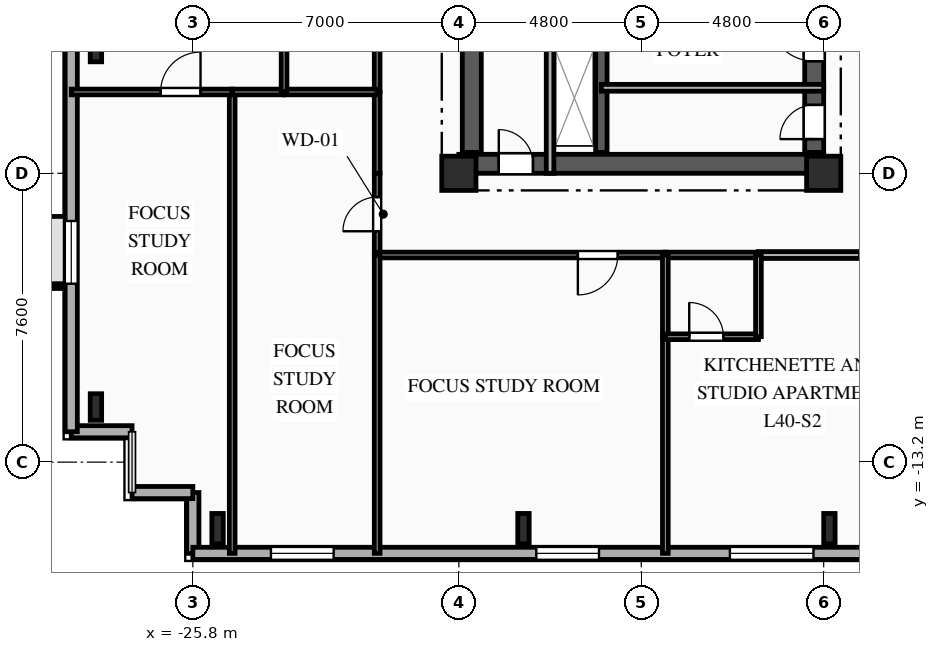
"""IFC4 building model, lengths in metres.
Left out: names, types, materials, properties, quantities, classifications, styles, units other than length and angle.
Written with IfcOpenShell. Run it as: python <this file> out.ifc"""

import sys

from ifc_helpers import new_model, si_unit, direction, frame, frame_2d, origin, origin_2d, place, context, subcontext, project, spatial, rectangle, i_section, extrude, element, fill, save


model = new_model("IFC4")
c1 = context("Model", 3, precision=1e-05, world=origin(), true_north=direction((0.0, 1.0)))
c2 = subcontext(c1, "Body", "Model", "MODEL_VIEW")
j1 = project(units=[si_unit("LENGTHUNIT", "METRE"), si_unit("PLANEANGLEUNIT", "RADIAN")], contexts=[c1])
p1 = place(None, origin())
s1 = spatial("IfcSite", under=j1, at=p1, CompositionType="ELEMENT")
p2 = place(p1, origin())
s2 = spatial("IfcBuilding", under=s1, at=p2, CompositionType="ELEMENT")
p3 = place(p2, frame((0.0, 0.0, 144.4)))
s3 = spatial("IfcBuildingStorey", under=s2, at=p3, CompositionType="ELEMENT", Elevation=144.4)
for number, where, z_axis, x_axis in (
    (1, (-18.8, -5.6, 0.0), (0.0, 0.0, 1.0), (1.0, 0.0, 0.0)),
    (2, (-9.2, -5.6, 0.0), (0.0, 0.0, 1.0), (1.0, 0.0, 0.0)),
):
    element("IfcColumn", number, at=place(p3, frame(where, z_axis=z_axis, x_axis=x_axis)), inside=s3, PredefinedType="COLUMN", context=c2, shape_type="SweptSolid", body=[
        extrude(rectangle(XDim=0.9, YDim=0.9, at=origin_2d()), origin(), (0.0, 0.0, 1.0), 3.35),
    ])
for number, where, z_axis, x_axis in (
    (3, (-25.15, -14.95, 0.0), (0.0, 0.0, 1.0), (1.0, 0.0, 0.0)),
    (4, (-17.1, -14.95, 0.0), (0.0, 0.0, 1.0), (1.0, 0.0, 0.0)),
    (5, (-9.05, -14.95, 0.0), (0.0, 0.0, 1.0), (1.0, 0.0, 0.0)),
):
    element("IfcColumn", number, at=place(p3, frame(where, z_axis=z_axis, x_axis=x_axis)), inside=s3, PredefinedType="COLUMN", context=c2, shape_type="SweptSolid", body=[
        extrude(i_section(OverallWidth=0.3, OverallDepth=0.8, WebThickness=0.018, FlangeThickness=0.033, FilletRadius=0.03, at=origin_2d()), origin(), (0.0, 0.0, 1.0), 3.35),
    ])
for number, where, z_axis, x_axis in (
    (6, (-28.35, -2.317, 0.0), (0.0, 0.0, 1.0), (1.0, 0.0, 0.0)),
    (7, (-28.35, -11.75, 0.0), (0.0, 0.0, 1.0), (1.0, 0.0, 0.0)),
):
    element("IfcColumn", number, at=place(p3, frame(where, z_axis=z_axis, x_axis=x_axis)), inside=s3, PredefinedType="COLUMN", context=c2, shape_type="SweptSolid", body=[
        extrude(i_section(OverallWidth=0.3, OverallDepth=0.7, WebThickness=0.017, FlangeThickness=0.032, FilletRadius=0.027, at=origin_2d()), origin(), (0.0, 0.0, 1.0), 3.35),
    ])
p4 = place(p3, frame((-25.8, -15.6, 0.0), z_axis=(0.0, 0.0, 1.0), x_axis=(0.0, 1.0, 0.0)))
e8 = element("IfcWall", 8, at=p4, inside=s3, PredefinedType="SOLIDWALL", context=c2, shape_type="SweptSolid", body=[
    extrude(rectangle(XDim=1.6, YDim=0.32, at=frame_2d((0.8, 0.0))), origin(), (0.0, 0.0, 1.0), 3.04),
])
p5 = place(p3, frame((-25.8, -14.0, 0.0), z_axis=(0.0, 0.0, 1.0), x_axis=(-1.0, 0.0, 0.0)))
e9 = element("IfcWall", 9, at=p5, inside=s3, PredefinedType="SOLIDWALL", context=c2, shape_type="SweptSolid", body=[
    extrude(rectangle(XDim=1.6, YDim=0.32, at=frame_2d((0.8, 0.0))), origin(), (0.0, 0.0, 1.0), 3.04),
])
p6 = place(p3, frame((-27.4, -12.4, 0.0), z_axis=(0.0, 0.0, 1.0), x_axis=(-1.0, 0.0, 0.0)))
e10 = element("IfcWall", 10, at=p6, inside=s3, PredefinedType="SOLIDWALL", context=c2, shape_type="SweptSolid", body=[
    extrude(rectangle(XDim=1.6, YDim=0.32, at=frame_2d((0.8, 0.0))), origin(), (0.0, 0.0, 1.0), 3.04),
])
p7 = place(p3, frame((-29.0, -12.4, 0.0), z_axis=(0.0, 0.0, 1.0), x_axis=(0.0, 1.0, 0.0)))
e11 = element("IfcWall", 11, at=p7, inside=s3, PredefinedType="SOLIDWALL", context=c2, shape_type="SweptSolid", body=[
    extrude(rectangle(XDim=29.6, YDim=0.32, at=frame_2d((14.8, 0.0))), origin(), (0.0, 0.0, 1.0), 3.04),
])
p8 = place(p7, frame((3.895, 0.0, 0.85)))
e12 = element("IfcOpeningElement", 12, at=p8, cuts=e11, PredefinedType="OPENING", context=c2, shape_type="SweptSolid", body=[
    extrude(rectangle(XDim=1.65, YDim=1.85, at=frame_2d((0.825, 0.925))), frame((0.0, 0.17, 0.0), z_axis=(0.0, -1.0, 0.0), x_axis=(1.0, 0.0, 0.0)), (0.0, 0.0, 1.0), 0.34),
])
p9 = place(p7, frame((13.74, 0.0, 0.85)))
e13 = element("IfcOpeningElement", 13, at=p9, cuts=e11, PredefinedType="OPENING", context=c2, shape_type="SweptSolid", body=[
    extrude(rectangle(XDim=2.2, YDim=1.85, at=frame_2d((1.1, 0.925))), frame((0.0, 0.17, 0.0), z_axis=(0.0, -1.0, 0.0), x_axis=(1.0, 0.0, 0.0)), (0.0, 0.0, 1.0), 0.34),
])
p10 = place(p7, frame((24.135, 0.0, 0.85)))
e14 = element("IfcOpeningElement", 14, at=p10, cuts=e11, PredefinedType="OPENING", context=c2, shape_type="SweptSolid", body=[
    extrude(rectangle(XDim=1.65, YDim=1.85, at=frame_2d((0.825, 0.925))), frame((0.0, 0.17, 0.0), z_axis=(0.0, -1.0, 0.0), x_axis=(1.0, 0.0, 0.0)), (0.0, 0.0, 1.0), 0.34),
])
p11 = place(p3, frame((23.8, -15.6, 0.0), z_axis=(0.0, 0.0, 1.0), x_axis=(-1.0, 0.0, 0.0)))
e15 = element("IfcWall", 15, at=p11, inside=s3, PredefinedType="SOLIDWALL", context=c2, shape_type="SweptSolid", body=[
    extrude(rectangle(XDim=49.6, YDim=0.32, at=frame_2d((24.8, 0.0))), origin(), (0.0, 0.0, 1.0), 3.04),
])
p12 = place(p11, frame((1.13, 0.0, 0.85)))
e16 = element("IfcOpeningElement", 16, at=p12, cuts=e15, PredefinedType="OPENING", context=c2, shape_type="SweptSolid", body=[
    extrude(rectangle(XDim=1.1, YDim=1.85, at=frame_2d((0.55, 0.925))), frame((0.0, 0.17, 0.0), z_axis=(0.0, -1.0, 0.0), x_axis=(1.0, 0.0, 0.0)), (0.0, 0.0, 1.0), 0.34),
])
p13 = place(p11, frame((5.255, 0.0, 0.85)))
e17 = element("IfcOpeningElement", 17, at=p13, cuts=e15, PredefinedType="OPENING", context=c2, shape_type="SweptSolid", body=[
    extrude(rectangle(XDim=1.65, YDim=1.85, at=frame_2d((0.825, 0.925))), frame((0.0, 0.17, 0.0), z_axis=(0.0, -1.0, 0.0), x_axis=(1.0, 0.0, 0.0)), (0.0, 0.0, 1.0), 0.34),
])
p14 = place(p11, frame((11.66, 0.0, 0.85)))
e18 = element("IfcOpeningElement", 18, at=p14, cuts=e15, PredefinedType="OPENING", context=c2, shape_type="SweptSolid", body=[
    extrude(rectangle(XDim=2.2, YDim=1.85, at=frame_2d((1.1, 0.925))), frame((0.0, 0.17, 0.0), z_axis=(0.0, -1.0, 0.0), x_axis=(1.0, 0.0, 0.0)), (0.0, 0.0, 1.0), 0.34),
])
p15 = place(p11, frame((18.66, 0.0, 0.85)))
e19 = element("IfcOpeningElement", 19, at=p15, cuts=e15, PredefinedType="OPENING", context=c2, shape_type="SweptSolid", body=[
    extrude(rectangle(XDim=2.2, YDim=1.85, at=frame_2d((1.1, 0.925))), frame((0.0, 0.17, 0.0), z_axis=(0.0, -1.0, 0.0), x_axis=(1.0, 0.0, 0.0)), (0.0, 0.0, 1.0), 0.34),
])
p16 = place(p11, frame((25.66, 0.0, 0.85)))
e20 = element("IfcOpeningElement", 20, at=p16, cuts=e15, PredefinedType="OPENING", context=c2, shape_type="SweptSolid", body=[
    extrude(rectangle(XDim=2.2, YDim=1.85, at=frame_2d((1.1, 0.925))), frame((0.0, 0.17, 0.0), z_axis=(0.0, -1.0, 0.0), x_axis=(1.0, 0.0, 0.0)), (0.0, 0.0, 1.0), 0.34),
])
p17 = place(p11, frame((33.268, 0.0, 0.85)))
e21 = element("IfcOpeningElement", 21, at=p17, cuts=e15, PredefinedType="OPENING", context=c2, shape_type="SweptSolid", body=[
    extrude(rectangle(XDim=2.2, YDim=1.85, at=frame_2d((1.1, 0.925))), frame((0.0, 0.17, 0.0), z_axis=(0.0, -1.0, 0.0), x_axis=(1.0, 0.0, 0.0)), (0.0, 0.0, 1.0), 0.34),
])
p18 = place(p11, frame((38.913, 0.0, 0.85)))
e22 = element("IfcOpeningElement", 22, at=p18, cuts=e15, PredefinedType="OPENING", context=c2, shape_type="SweptSolid", body=[
    extrude(rectangle(XDim=1.65, YDim=1.85, at=frame_2d((0.825, 0.925))), frame((0.0, 0.17, 0.0), z_axis=(0.0, -1.0, 0.0), x_axis=(1.0, 0.0, 0.0)), (0.0, 0.0, 1.0), 0.34),
])
p19 = place(p11, frame((45.895, 0.0, 0.85)))
e23 = element("IfcOpeningElement", 23, at=p19, cuts=e15, PredefinedType="OPENING", context=c2, shape_type="SweptSolid", body=[
    extrude(rectangle(XDim=1.65, YDim=1.85, at=frame_2d((0.825, 0.925))), frame((0.0, 0.17, 0.0), z_axis=(0.0, -1.0, 0.0), x_axis=(1.0, 0.0, 0.0)), (0.0, 0.0, 1.0), 0.34),
])
p20 = place(p3, frame((-18.8, -5.35, 0.0), z_axis=(0.0, 0.0, 1.0), x_axis=(1.0, 0.0, 0.0)))
e24 = element("IfcWall", 24, at=p20, inside=s3, PredefinedType="SHEAR", context=c2, shape_type="SweptSolid", body=[
    extrude(rectangle(XDim=9.6, YDim=0.5, at=frame_2d((4.8, 0.0))), origin(), (0.0, 0.0, 1.0), 3.04),
])
p21 = place(p20, frame((1.05, 0.0, 0.0)))
e25 = element("IfcOpeningElement", 25, at=p21, cuts=e24, PredefinedType="OPENING", context=c2, shape_type="SweptSolid", body=[
    extrude(rectangle(XDim=0.9, YDim=2.1, at=frame_2d((0.45, 1.05))), frame((0.0, 0.26, 0.0), z_axis=(0.0, -1.0, 0.0), x_axis=(1.0, 0.0, 0.0)), (0.0, 0.0, 1.0), 0.52),
])
p22 = place(p3, frame((-18.46, -5.05, 0.0), z_axis=(0.0, 0.0, 1.0), x_axis=(0.0, 1.0, 0.0)))
e26 = element("IfcWall", 26, at=p22, inside=s3, PredefinedType="SHEAR", context=c2, shape_type="SweptSolid", body=[
    extrude(rectangle(XDim=10.1, YDim=0.5, at=frame_2d((5.05, 0.0))), origin(), (0.0, 0.0, 1.0), 3.04),
])
p23 = place(p3, frame((-9.45, -5.05, 0.0), z_axis=(0.0, 0.0, 1.0), x_axis=(0.0, 1.0, 0.0)))
e27 = element("IfcWall", 27, at=p23, inside=s3, PredefinedType="SHEAR", context=c2, shape_type="SweptSolid", body=[
    extrude(rectangle(XDim=10.1, YDim=0.5, at=frame_2d((5.05, 0.0))), origin(), (0.0, 0.0, 1.0), 3.04),
])
p24 = place(p23, frame((7.175, 0.0, 0.0)))
e28 = element("IfcOpeningElement", 28, at=p24, cuts=e27, PredefinedType="OPENING", context=c2, shape_type="SweptSolid", body=[
    extrude(rectangle(XDim=0.9, YDim=2.1, at=frame_2d((0.45, 1.05))), frame((0.0, 0.26, 0.0), z_axis=(0.0, -1.0, 0.0), x_axis=(1.0, 0.0, 0.0)), (0.0, 0.0, 1.0), 0.52),
])
p25 = place(p23, frame((2.4, 0.0, 0.0)))
e29 = element("IfcOpeningElement", 29, at=p25, cuts=e27, PredefinedType="OPENING", context=c2, shape_type="SweptSolid", body=[
    extrude(rectangle(XDim=1.2, YDim=2.15, at=frame_2d((0.6, 1.075))), frame((0.0, 0.26, 0.0), z_axis=(0.0, -1.0, 0.0), x_axis=(1.0, 0.0, 0.0)), (0.0, 0.0, 1.0), 0.52),
])
p26 = place(p23, frame((0.35, 0.0, 0.0)))
e30 = element("IfcOpeningElement", 30, at=p26, cuts=e27, PredefinedType="OPENING", context=c2, shape_type="SweptSolid", body=[
    extrude(rectangle(XDim=0.9, YDim=2.1, at=frame_2d((0.45, 1.05))), frame((0.0, 0.26, 0.0), z_axis=(0.0, -1.0, 0.0), x_axis=(1.0, 0.0, 0.0)), (0.0, 0.0, 1.0), 0.52),
])
p27 = place(p23, frame((5.0, 0.0, 0.0)))
e31 = element("IfcOpeningElement", 31, at=p27, cuts=e27, PredefinedType="OPENING", context=c2, shape_type="SweptSolid", body=[
    extrude(rectangle(XDim=0.9, YDim=2.1, at=frame_2d((0.45, 1.05))), frame((0.0, 0.26, 0.0), z_axis=(0.0, -1.0, 0.0), x_axis=(1.0, 0.0, 0.0)), (0.0, 0.0, 1.0), 0.52),
])
p28 = place(p3, frame((-15.05, -5.05, 0.0), z_axis=(0.0, 0.0, 1.0), x_axis=(0.0, 1.0, 0.0)))
e32 = element("IfcWall", 32, at=p28, inside=s3, PredefinedType="SHEAR", context=c2, shape_type="SweptSolid", body=[
    extrude(rectangle(XDim=10.1, YDim=0.3, at=frame_2d((5.05, 0.0))), origin(), (0.0, 0.0, 1.0), 3.04),
])
p29 = place(p3, frame((-16.4, -5.6, 0.0), z_axis=(0.0, 0.0, 1.0), x_axis=(0.0, 1.0, 0.0)))
e33 = element("IfcWall", 33, at=p29, inside=s3, PredefinedType="PARTITIONING", context=c2, shape_type="SweptSolid", body=[
    extrude(rectangle(XDim=3.49, YDim=0.2, at=frame_2d((1.745, 0.0))), origin(), (0.0, 0.0, 1.0), 3.04),
])
p30 = place(p3, frame((-15.05, -3.35, 0.0), z_axis=(0.0, 0.0, 1.0), x_axis=(1.0, 0.0, 0.0)))
e34 = element("IfcWall", 34, at=p30, inside=s3, PredefinedType="PARTITIONING", context=c2, shape_type="SweptSolid", body=[
    extrude(rectangle(XDim=5.85, YDim=0.18, at=frame_2d((2.925, 0.0))), origin(), (0.0, 0.0, 1.0), 2.755),
])
p31 = place(p3, frame((-20.95, -7.75, 0.0), z_axis=(0.0, 0.0, 1.0), x_axis=(0.0, 1.0, 0.0)))
e35 = element("IfcWall", 35, at=p31, inside=s3, PredefinedType="PARTITIONING", context=c2, shape_type="SweptSolid", body=[
    extrude(rectangle(XDim=2.15, YDim=0.15, at=frame_2d((1.075, 0.0))), origin(), (0.0, 0.0, 1.0), 3.04),
])
p32 = place(p31, frame((0.625, 0.0, 0.0)))
e36 = element("IfcOpeningElement", 36, at=p32, cuts=e35, PredefinedType="OPENING", context=c2, shape_type="SweptSolid", body=[
    extrude(rectangle(XDim=0.9, YDim=2.1, at=frame_2d((0.45, 1.05))), frame((0.0, 0.085, 0.0), z_axis=(0.0, -1.0, 0.0), x_axis=(1.0, 0.0, 0.0)), (0.0, 0.0, 1.0), 0.17),
])
p33 = place(p3, frame((-13.367, -7.75, 0.0), z_axis=(0.0, 0.0, 1.0), x_axis=(-1.0, 0.0, 0.0)))
e37 = element("IfcWall", 37, at=p33, inside=s3, PredefinedType="PARTITIONING", context=c2, shape_type="SweptSolid", body=[
    extrude(rectangle(XDim=7.583, YDim=0.15, at=frame_2d((3.792, 0.0))), origin(), (0.0, 0.0, 1.0), 3.04),
])
p34 = place(p33, frame((1.252, 0.0, 0.0)))
e38 = element("IfcOpeningElement", 38, at=p34, cuts=e37, PredefinedType="OPENING", context=c2, shape_type="SweptSolid", body=[
    extrude(rectangle(XDim=1.05, YDim=2.15, at=frame_2d((0.525, 1.075))), frame((0.0, 0.085, 0.0), z_axis=(0.0, -1.0, 0.0), x_axis=(1.0, 0.0, 0.0)), (0.0, 0.0, 1.0), 0.17),
])
p35 = place(p3, frame((-6.383, -7.75, 0.0), z_axis=(0.0, 0.0, 1.0), x_axis=(-1.0, 0.0, 0.0)))
e39 = element("IfcWall", 39, at=p35, inside=s3, PredefinedType="PARTITIONING", context=c2, shape_type="SweptSolid", body=[
    extrude(rectangle(XDim=4.534, YDim=0.18, at=frame_2d((2.267, 0.0))), origin(), (0.0, 0.0, 1.0), 3.04),
])
p36 = place(p35, frame((0.877, 0.0, 0.0)))
e40 = element("IfcOpeningElement", 40, at=p36, cuts=e39, PredefinedType="OPENING", context=c2, shape_type="SweptSolid", body=[
    extrude(rectangle(XDim=1.0, YDim=2.15, at=frame_2d((0.5, 1.075))), frame((0.0, 0.1, 0.0), z_axis=(0.0, -1.0, 0.0), x_axis=(1.0, 0.0, 0.0)), (0.0, 0.0, 1.0), 0.2),
])
p37 = place(p3, frame((-10.917, -7.75, 0.0), z_axis=(0.0, 0.0, 1.0), x_axis=(-1.0, 0.0, 0.0)))
e41 = element("IfcWall", 41, at=p37, inside=s3, PredefinedType="PLUMBINGWALL", context=c2, shape_type="SweptSolid", body=[
    extrude(rectangle(XDim=2.45, YDim=0.15, at=frame_2d((1.225, 0.0))), origin(), (0.0, 0.0, 1.0), 3.04),
])
p38 = place(p3, frame((-20.95, -5.6, 0.0), z_axis=(0.0, 0.0, 1.0), x_axis=(0.0, 1.0, 0.0)))
e42 = element("IfcWall", 42, at=p38, inside=s3, PredefinedType="PARTITIONING", context=c2, shape_type="SweptSolid", body=[
    extrude(rectangle(XDim=2.14, YDim=0.15, at=frame_2d((1.07, 0.0))), origin(), (0.0, 0.0, 1.0), 3.04),
])
p39 = place(p3, frame((-20.95, -3.46, 0.0), z_axis=(0.0, 0.0, 1.0), x_axis=(0.0, 1.0, 0.0)))
e43 = element("IfcWall", 43, at=p39, inside=s3, PredefinedType="PLUMBINGWALL", context=c2, shape_type="SweptSolid", body=[
    extrude(rectangle(XDim=2.15, YDim=0.15, at=frame_2d((1.075, 0.0))), origin(), (0.0, 0.0, 1.0), 3.04),
])
p40 = place(p3, frame((-24.765, -3.46, 0.0), z_axis=(0.0, 0.0, 1.0), x_axis=(0.0, -1.0, 0.0)))
e44 = element("IfcWall", 44, at=p40, inside=s3, PredefinedType="PARTITIONING", context=c2, shape_type="SweptSolid", body=[
    extrude(rectangle(XDim=12.14, YDim=0.15, at=frame_2d((6.07, 0.0))), origin(), (0.0, 0.0, 1.0), 3.04),
])
p41 = place(p3, frame((-29.0, -3.46, 0.0), z_axis=(0.0, 0.0, 1.0), x_axis=(1.0, 0.0, 0.0)))
e45 = element("IfcWall", 45, at=p41, inside=s3, PredefinedType="PARTITIONING", context=c2, shape_type="SweptSolid", body=[
    extrude(rectangle(XDim=4.235, YDim=0.15, at=frame_2d((2.118, 0.0))), origin(), (0.0, 0.0, 1.0), 3.04),
])
p42 = place(p41, frame((2.352, 0.0, 0.0)))
e46 = element("IfcOpeningElement", 46, at=p42, cuts=e45, PredefinedType="OPENING", context=c2, shape_type="SweptSolid", body=[
    extrude(rectangle(XDim=1.05, YDim=2.15, at=frame_2d((0.525, 1.075))), frame((0.0, 0.085, 0.0), z_axis=(0.0, -1.0, 0.0), x_axis=(1.0, 0.0, 0.0)), (0.0, 0.0, 1.0), 0.17),
])
p43 = place(p3, frame((-24.765, -3.46, 0.0), z_axis=(0.0, 0.0, 1.0), x_axis=(1.0, 0.0, 0.0)))
e47 = element("IfcWall", 47, at=p43, inside=s3, PredefinedType="PARTITIONING", context=c2, shape_type="SweptSolid", body=[
    extrude(rectangle(XDim=1.365, YDim=0.15, at=frame_2d((0.683, 0.0))), origin(), (0.0, 0.0, 1.0), 3.04),
])
p44 = place(p3, frame((-23.4, -3.46, 0.0), z_axis=(0.0, 0.0, 1.0), x_axis=(1.0, 0.0, 0.0)))
e48 = element("IfcWall", 48, at=p44, inside=s3, PredefinedType="PLUMBINGWALL", context=c2, shape_type="SweptSolid", body=[
    extrude(rectangle(XDim=2.45, YDim=0.15, at=frame_2d((1.225, 0.0))), origin(), (0.0, 0.0, 1.0), 3.04),
])
p45 = place(p3, frame((-20.95, -7.75, 0.0), z_axis=(0.0, 0.0, 1.0), x_axis=(0.0, -1.0, 0.0)))
e49 = element("IfcWall", 49, at=p45, inside=s3, PredefinedType="PARTITIONING", context=c2, shape_type="SweptSolid", body=[
    extrude(rectangle(XDim=7.85, YDim=0.15, at=frame_2d((3.925, 0.0))), origin(), (0.0, 0.0, 1.0), 3.04),
])
p46 = place(p3, frame((-23.4, -1.31, 0.0), z_axis=(0.0, 0.0, 1.0), x_axis=(0.0, -1.0, 0.0)))
e50 = element("IfcWall", 50, at=p46, inside=s3, PredefinedType="PLUMBINGWALL", context=c2, shape_type="SweptSolid", body=[
    extrude(rectangle(XDim=2.15, YDim=0.15, at=frame_2d((1.075, 0.0))), origin(), (0.0, 0.0, 1.0), 3.04),
])
p47 = place(p3, frame((-13.367, -9.9, 0.0), z_axis=(0.0, 0.0, 1.0), x_axis=(0.0, -1.0, 0.0)))
e51 = element("IfcWall", 51, at=p47, inside=s3, PredefinedType="PARTITIONING", context=c2, shape_type="SweptSolid", body=[
    extrude(rectangle(XDim=5.7, YDim=0.15, at=frame_2d((2.85, 0.0))), origin(), (0.0, 0.0, 1.0), 3.04),
])
p48 = place(p3, frame((-13.367, -7.75, 0.0), z_axis=(0.0, 0.0, 1.0), x_axis=(0.0, -1.0, 0.0)))
e52 = element("IfcWall", 52, at=p48, inside=s3, PredefinedType="PLUMBINGWALL", context=c2, shape_type="SweptSolid", body=[
    extrude(rectangle(XDim=2.15, YDim=0.15, at=frame_2d((1.075, 0.0))), origin(), (0.0, 0.0, 1.0), 3.04),
])
p49 = place(p3, frame((-13.367, -9.9, 0.0), z_axis=(0.0, 0.0, 1.0), x_axis=(1.0, 0.0, 0.0)))
e53 = element("IfcWall", 53, at=p49, inside=s3, PredefinedType="PLUMBINGWALL", context=c2, shape_type="SweptSolid", body=[
    extrude(rectangle(XDim=2.45, YDim=0.15, at=frame_2d((1.225, 0.0))), origin(), (0.0, 0.0, 1.0), 3.04),
])
p50 = place(p49, frame((0.629, 0.0, 0.0)))
e54 = element("IfcOpeningElement", 54, at=p50, cuts=e53, PredefinedType="OPENING", context=c2, shape_type="SweptSolid", body=[
    extrude(rectangle(XDim=0.9, YDim=2.1, at=frame_2d((0.45, 1.05))), frame((0.0, 0.085, 0.0), z_axis=(0.0, -1.0, 0.0), x_axis=(1.0, 0.0, 0.0)), (0.0, 0.0, 1.0), 0.17),
])
p51 = place(p3, frame((-10.917, -9.9, 0.0), z_axis=(0.0, 0.0, 1.0), x_axis=(0.0, 1.0, 0.0)))
e55 = element("IfcWall", 55, at=p51, inside=s3, PredefinedType="PLUMBINGWALL", context=c2, shape_type="SweptSolid", body=[
    extrude(rectangle(XDim=2.15, YDim=0.15, at=frame_2d((1.075, 0.0))), origin(), (0.0, 0.0, 1.0), 3.04),
])
p52 = place(p8, origin())
e56 = element("IfcWindow", 56, at=p52, inside=s3, PartitioningType="SINGLE_PANEL", PredefinedType="WINDOW", context=c2, shape_type="SweptSolid", body=[
    extrude(rectangle(XDim=1.65, YDim=1.85, at=frame_2d((0.825, 0.925))), frame((0.0, 0.03, 0.0), z_axis=(0.0, -1.0, 0.0), x_axis=(1.0, 0.0, 0.0)), (0.0, 0.0, 1.0), 0.06),
])
fill(e12, e56)
p53 = place(p17, origin())
e57 = element("IfcWindow", 57, at=p53, inside=s3, PartitioningType="SINGLE_PANEL", PredefinedType="WINDOW", context=c2, shape_type="SweptSolid", body=[
    extrude(rectangle(XDim=2.2, YDim=1.85, at=frame_2d((1.1, 0.925))), frame((0.0, 0.03, 0.0), z_axis=(0.0, -1.0, 0.0), x_axis=(1.0, 0.0, 0.0)), (0.0, 0.0, 1.0), 0.06),
])
fill(e21, e57)
p54 = place(p18, origin())
e58 = element("IfcWindow", 58, at=p54, inside=s3, PartitioningType="SINGLE_PANEL", PredefinedType="WINDOW", context=c2, shape_type="SweptSolid", body=[
    extrude(rectangle(XDim=1.65, YDim=1.85, at=frame_2d((0.825, 0.925))), frame((0.0, 0.03, 0.0), z_axis=(0.0, -1.0, 0.0), x_axis=(1.0, 0.0, 0.0)), (0.0, 0.0, 1.0), 0.06),
])
fill(e22, e58)
p55 = place(p19, origin())
e59 = element("IfcWindow", 59, at=p55, inside=s3, PartitioningType="SINGLE_PANEL", PredefinedType="WINDOW", context=c2, shape_type="SweptSolid", body=[
    extrude(rectangle(XDim=1.65, YDim=1.85, at=frame_2d((0.825, 0.925))), frame((0.0, 0.03, 0.0), z_axis=(0.0, -1.0, 0.0), x_axis=(1.0, 0.0, 0.0)), (0.0, 0.0, 1.0), 0.06),
])
fill(e23, e59)
p56 = place(p21, origin())
e60 = element("IfcDoor", 60, at=p56, inside=s3, OperationType="SINGLE_SWING_LEFT", PredefinedType="DOOR", context=c2, shape_type="SweptSolid", body=[
    extrude(rectangle(XDim=0.9, YDim=2.1, at=frame_2d((0.45, 1.05))), frame((0.0, 0.025, 0.0), z_axis=(0.0, -1.0, 0.0), x_axis=(1.0, 0.0, 0.0)), (0.0, 0.0, 1.0), 0.05),
])
fill(e25, e60)
p57 = place(p25, origin())
e61 = element("IfcDoor", 61, at=p57, inside=s3, OperationType="SINGLE_SWING_RIGHT", PredefinedType="DOOR", context=c2, shape_type="SweptSolid", body=[
    extrude(rectangle(XDim=1.2, YDim=2.15, at=frame_2d((0.6, 1.075))), frame((0.0, 0.025, 0.0), z_axis=(0.0, -1.0, 0.0), x_axis=(1.0, 0.0, 0.0)), (0.0, 0.0, 1.0), 0.05),
])
fill(e29, e61)
p58 = place(p26, origin())
e62 = element("IfcDoor", 62, at=p58, inside=s3, OperationType="SINGLE_SWING_LEFT", PredefinedType="DOOR", context=c2, shape_type="SweptSolid", body=[
    extrude(rectangle(XDim=0.9, YDim=2.1, at=frame_2d((0.45, 1.05))), frame((0.0, 0.025, 0.0), z_axis=(0.0, -1.0, 0.0), x_axis=(1.0, 0.0, 0.0)), (0.0, 0.0, 1.0), 0.05),
])
fill(e30, e62)
p59 = place(p32, origin())
e63 = element("IfcDoor", 63, at=p59, inside=s3, OperationType="SINGLE_SWING_LEFT", PredefinedType="DOOR", context=c2, shape_type="SweptSolid", body=[
    extrude(rectangle(XDim=0.9, YDim=2.1, at=frame_2d((0.45, 1.05))), frame((0.0, 0.025, 0.0), z_axis=(0.0, -1.0, 0.0), x_axis=(1.0, 0.0, 0.0)), (0.0, 0.0, 1.0), 0.05),
])
fill(e36, e63)
p60 = place(p34, origin())
e64 = element("IfcDoor", 64, at=p60, inside=s3, OperationType="SINGLE_SWING_RIGHT", PredefinedType="DOOR", context=c2, shape_type="SweptSolid", body=[
    extrude(rectangle(XDim=1.05, YDim=2.15, at=frame_2d((0.525, 1.075))), frame((0.0, 0.025, 0.0), z_axis=(0.0, -1.0, 0.0), x_axis=(1.0, 0.0, 0.0)), (0.0, 0.0, 1.0), 0.05),
])
fill(e38, e64)
p61 = place(p42, origin())
e65 = element("IfcDoor", 65, at=p61, inside=s3, OperationType="SINGLE_SWING_RIGHT", PredefinedType="DOOR", context=c2, shape_type="SweptSolid", body=[
    extrude(rectangle(XDim=1.05, YDim=2.15, at=frame_2d((0.525, 1.075))), frame((0.0, 0.025, 0.0), z_axis=(0.0, -1.0, 0.0), x_axis=(1.0, 0.0, 0.0)), (0.0, 0.0, 1.0), 0.05),
])
fill(e46, e65)
p62 = place(p50, origin())
e66 = element("IfcDoor", 66, at=p62, inside=s3, OperationType="SINGLE_SWING_LEFT", PredefinedType="DOOR", context=c2, shape_type="SweptSolid", body=[
    extrude(rectangle(XDim=0.9, YDim=2.1, at=frame_2d((0.45, 1.05))), frame((0.0, 0.025, 0.0), z_axis=(0.0, -1.0, 0.0), x_axis=(1.0, 0.0, 0.0)), (0.0, 0.0, 1.0), 0.05),
])
fill(e54, e66)
save(model, sys.argv[1])
